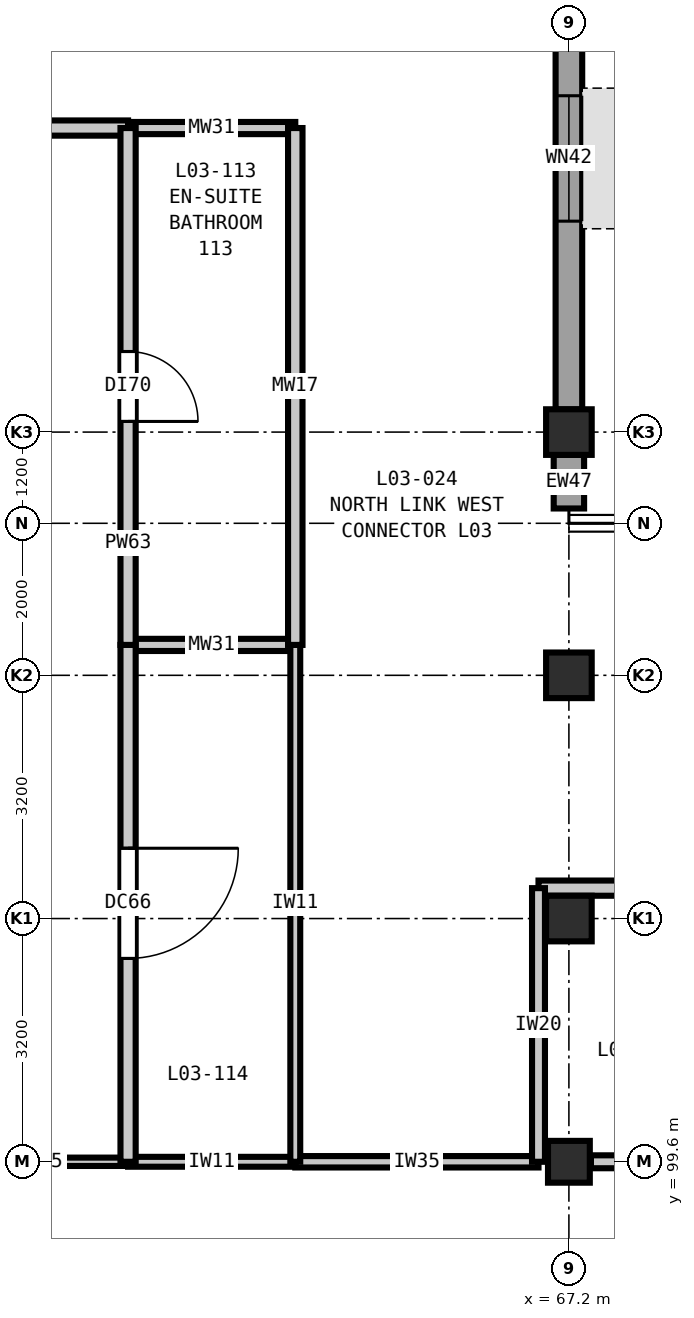
"""IFC4 building model, lengths in metres.
Left out: names, types, materials, properties, quantities, classifications, styles, units other than length and angle.
Written with IfcOpenShell. Run it as: python <this file> out.ifc"""

import sys

from ifc_helpers import new_model, si_unit, direction, frame, frame_2d, origin, origin_2d, place, context, subcontext, project, spatial, rectangle, extrude, element, fill, save


model = new_model("IFC4")
c1 = context("Model", 3, precision=1e-05, world=origin(), true_north=direction((0.0, 1.0)))
c2 = subcontext(c1, "Body", "Model", "MODEL_VIEW")
j1 = project(units=[si_unit("LENGTHUNIT", "METRE"), si_unit("PLANEANGLEUNIT", "RADIAN")], contexts=[c1])
p1 = place(None, origin())
s1 = spatial("IfcSite", under=j1, at=p1, CompositionType="ELEMENT")
p2 = place(p1, origin())
s2 = spatial("IfcBuilding", under=s1, at=p2, CompositionType="ELEMENT")
p3 = place(p2, frame((0.0, 0.0, 16.2)))
s3 = spatial("IfcBuildingStorey", under=s2, at=p3, CompositionType="ELEMENT", Elevation=16.2)
p4 = place(p3, frame((67.2, 99.6, 0.0), z_axis=(0.0, 0.0, 1.0), x_axis=(1.0, 0.0, 0.0)))
e1 = element("IfcColumn", 1, at=p4, inside=s3, PredefinedType="COLUMN", context=c2, shape_type="SweptSolid", body=[
    extrude(rectangle(XDim=0.55, YDim=0.55, at=origin_2d()), origin(), (0.0, 0.0, 1.0), 4.2),
])
for number, where, z_axis, x_axis in (
    (2, (67.2, 102.8, 0.0), (0.0, 0.0, 1.0), (1.0, 0.0, 0.0)),
    (3, (67.2, 106.0, 0.0), (0.0, 0.0, 1.0), (1.0, 0.0, 0.0)),
    (4, (67.2, 109.2, 0.0), (0.0, 0.0, 1.0), (1.0, 0.0, 0.0)),
):
    element("IfcColumn", number, at=place(p3, frame(where, z_axis=z_axis, x_axis=x_axis)), inside=s3, PredefinedType="COLUMN", context=c2, shape_type="SweptSolid", body=[
        extrude(rectangle(XDim=0.6, YDim=0.6, at=origin_2d()), origin(), (0.0, 0.0, 1.0), 4.2),
    ])
p5 = place(p3, frame((67.2, 116.102, 0.0), z_axis=(0.0, 0.0, 1.0), x_axis=(0.0, -1.0, 0.0)))
e5 = element("IfcWall", 5, at=p5, inside=s3, PredefinedType="SOLIDWALL", context=c2, shape_type="SweptSolid", body=[
    extrude(rectangle(XDim=6.604, YDim=0.35, at=frame_2d((3.302, 0.0))), origin(), (0.0, 0.0, 1.0), 3.48),
])
p6 = place(p5, frame((2.477, 0.0, 0.9)))
e6 = element("IfcOpeningElement", 6, at=p6, cuts=e5, PredefinedType="OPENING", context=c2, shape_type="SweptSolid", body=[
    extrude(rectangle(XDim=1.65, YDim=2.15, at=frame_2d((0.825, 1.075))), frame((0.0, 0.185, 0.0), z_axis=(0.0, -1.0, 0.0), x_axis=(1.0, 0.0, 0.0)), (0.0, 0.0, 1.0), 0.37),
])
p7 = place(p3, frame((67.2, 108.902, 0.0), z_axis=(0.0, 0.0, 1.0), x_axis=(0.0, -1.0, 0.0)))
e7 = element("IfcWall", 7, at=p7, inside=s3, PredefinedType="SOLIDWALL", context=c2, shape_type="SweptSolid", body=[
    extrude(rectangle(XDim=0.707, YDim=0.4, at=frame_2d((0.354, 0.0))), origin(), (0.0, 0.0, 1.0), 3.48),
])
p8 = place(p3, frame((59.09, 99.6, 0.0), z_axis=(0.0, 0.0, 1.0), x_axis=(1.0, 0.0, 0.0)))
e8 = element("IfcWall", 8, at=p8, inside=s3, PredefinedType="PARTITIONING", context=c2, shape_type="SweptSolid", body=[
    extrude(rectangle(XDim=2.31, YDim=0.11, at=frame_2d((1.155, 0.0))), origin(), (0.0, 0.0, 1.0), 3.535),
])
p9 = place(p3, frame((61.4, 99.6, 0.0), z_axis=(0.0, 0.0, 1.0), x_axis=(1.0, 0.0, 0.0)))
e9 = element("IfcWall", 9, at=p9, inside=s3, PredefinedType="PARTITIONING", context=c2, shape_type="SweptSolid", body=[
    extrude(rectangle(XDim=2.2, YDim=0.13, at=frame_2d((1.1, 0.0))), origin(), (0.0, 0.0, 1.0), 3.535),
])
p10 = place(p3, frame((63.6, 99.6, 0.0), z_axis=(0.0, 0.0, 1.0), x_axis=(1.0, 0.0, 0.0)))
e10 = element("IfcWall", 10, at=p10, inside=s3, PredefinedType="PARTITIONING", context=c2, shape_type="SweptSolid", body=[
    extrude(rectangle(XDim=3.2, YDim=0.15, at=frame_2d((1.6, 0.0))), origin(), (0.0, 0.0, 1.0), 3.535),
])
p11 = place(p3, frame((67.49, 99.6, 0.0), z_axis=(0.0, 0.0, 1.0), x_axis=(1.0, 0.0, 0.0)))
e11 = element("IfcWall", 11, at=p11, inside=s3, PredefinedType="PARTITIONING", context=c2, shape_type="SweptSolid", body=[
    extrude(rectangle(XDim=1.81, YDim=0.17, at=frame_2d((0.905, 0.0))), origin(), (0.0, 0.0, 1.0), 3.535),
])
p12 = place(p3, frame((66.8, 103.2, 0.0), z_axis=(0.0, 0.0, 1.0), x_axis=(1.0, 0.0, 0.0)))
e12 = element("IfcWall", 12, at=p12, inside=s3, PredefinedType="PARTITIONING", context=c2, shape_type="SweptSolid", body=[
    extrude(rectangle(XDim=7.6, YDim=0.2, at=frame_2d((3.8, 0.0))), origin(), (0.0, 0.0, 1.0), 3.89),
])
p13 = place(p12, frame((3.075, 0.0, 0.0)))
e13 = element("IfcOpeningElement", 13, at=p13, cuts=e12, PredefinedType="OPENING", context=c2, shape_type="SweptSolid", body=[
    extrude(rectangle(XDim=1.45, YDim=2.25, at=frame_2d((0.725, 1.125))), frame((0.0, 0.11, 0.0), z_axis=(0.0, -1.0, 0.0), x_axis=(1.0, 0.0, 0.0)), (0.0, 0.0, 1.0), 0.22),
])
p14 = place(p3, frame((61.4, 106.4, 0.0), z_axis=(0.0, 0.0, 1.0), x_axis=(1.0, 0.0, 0.0)))
e14 = element("IfcWall", 14, at=p14, inside=s3, PredefinedType="PLUMBINGWALL", context=c2, shape_type="SweptSolid", body=[
    extrude(rectangle(XDim=2.2, YDim=0.16, at=frame_2d((1.1, 0.0))), origin(), (0.0, 0.0, 1.0), 3.89),
])
p15 = place(p3, frame((56.4, 113.2, 0.0), z_axis=(0.0, 0.0, 1.0), x_axis=(1.0, 0.0, 0.0)))
e15 = element("IfcWall", 15, at=p15, inside=s3, PredefinedType="PARTITIONING", context=c2, shape_type="SweptSolid", body=[
    extrude(rectangle(XDim=5.0, YDim=0.2, at=frame_2d((2.5, 0.0))), origin(), (0.0, 0.0, 1.0), 3.89),
])
p16 = place(p15, frame((1.85, 0.0, 0.0)))
e16 = element("IfcOpeningElement", 16, at=p16, cuts=e15, PredefinedType="OPENING", context=c2, shape_type="SweptSolid", body=[
    extrude(rectangle(XDim=1.3, YDim=2.2, at=frame_2d((0.65, 1.1))), frame((0.0, 0.11, 0.0), z_axis=(0.0, -1.0, 0.0), x_axis=(1.0, 0.0, 0.0)), (0.0, 0.0, 1.0), 0.22),
])
p17 = place(p3, frame((61.4, 113.2, 0.0), z_axis=(0.0, 0.0, 1.0), x_axis=(1.0, 0.0, 0.0)))
e17 = element("IfcWall", 17, at=p17, inside=s3, PredefinedType="PLUMBINGWALL", context=c2, shape_type="SweptSolid", body=[
    extrude(rectangle(XDim=2.2, YDim=0.16, at=frame_2d((1.1, 0.0))), origin(), (0.0, 0.0, 1.0), 3.89),
])
p18 = place(p3, frame((61.4, 99.6, 0.0), z_axis=(0.0, 0.0, 1.0), x_axis=(0.0, 1.0, 0.0)))
e18 = element("IfcWall", 18, at=p18, inside=s3, PredefinedType="PARTITIONING", context=c2, shape_type="SweptSolid", body=[
    extrude(rectangle(XDim=6.8, YDim=0.2, at=frame_2d((3.4, 0.0))), origin(), (0.0, 0.0, 1.0), 3.89),
])
p19 = place(p18, frame((2.675, 0.0, 0.0)))
e19 = element("IfcOpeningElement", 19, at=p19, cuts=e18, PredefinedType="OPENING", context=c2, shape_type="SweptSolid", body=[
    extrude(rectangle(XDim=1.45, YDim=2.25, at=frame_2d((0.725, 1.125))), frame((0.0, 0.11, 0.0), z_axis=(0.0, -1.0, 0.0), x_axis=(1.0, 0.0, 0.0)), (0.0, 0.0, 1.0), 0.22),
])
p20 = place(p3, frame((61.4, 106.4, 0.0), z_axis=(0.0, 0.0, 1.0), x_axis=(0.0, 1.0, 0.0)))
e20 = element("IfcWall", 20, at=p20, inside=s3, PredefinedType="PARTITIONING", context=c2, shape_type="SweptSolid", body=[
    extrude(rectangle(XDim=6.8, YDim=0.2, at=frame_2d((3.4, 0.0))), origin(), (0.0, 0.0, 1.0), 3.89),
])
p21 = place(p20, frame((2.94, 0.0, 0.0)))
e21 = element("IfcOpeningElement", 21, at=p21, cuts=e20, PredefinedType="OPENING", context=c2, shape_type="SweptSolid", body=[
    extrude(rectangle(XDim=0.92, YDim=2.1, at=frame_2d((0.46, 1.05))), frame((0.0, 0.11, 0.0), z_axis=(0.0, -1.0, 0.0), x_axis=(1.0, 0.0, 0.0)), (0.0, 0.0, 1.0), 0.22),
])
p22 = place(p3, frame((63.6, 99.6, 0.0), z_axis=(0.0, 0.0, 1.0), x_axis=(0.0, 1.0, 0.0)))
e22 = element("IfcWall", 22, at=p22, inside=s3, PredefinedType="PARTITIONING", context=c2, shape_type="SweptSolid", body=[
    extrude(rectangle(XDim=6.8, YDim=0.13, at=frame_2d((3.4, 0.0))), origin(), (0.0, 0.0, 1.0), 3.89),
])
p23 = place(p3, frame((63.6, 106.4, 0.0), z_axis=(0.0, 0.0, 1.0), x_axis=(0.0, 1.0, 0.0)))
e23 = element("IfcWall", 23, at=p23, inside=s3, PredefinedType="PLUMBINGWALL", context=c2, shape_type="SweptSolid", body=[
    extrude(rectangle(XDim=6.8, YDim=0.19, at=frame_2d((3.4, 0.0))), origin(), (0.0, 0.0, 1.0), 3.89),
])
p24 = place(p3, frame((66.8, 99.6, 0.0), z_axis=(0.0, 0.0, 1.0), x_axis=(0.0, 1.0, 0.0)))
e24 = element("IfcWall", 24, at=p24, inside=s3, PredefinedType="PARTITIONING", context=c2, shape_type="SweptSolid", body=[
    extrude(rectangle(XDim=3.6, YDim=0.17, at=frame_2d((1.8, 0.0))), origin(), (0.0, 0.0, 1.0), 3.89),
])
p25 = place(p6, origin())
e25 = element("IfcWindow", 25, at=p25, inside=s3, PartitioningType="DOUBLE_PANEL_VERTICAL", PredefinedType="WINDOW", context=c2, shape_type="SweptSolid", body=[
    extrude(rectangle(XDim=1.65, YDim=2.15, at=frame_2d((0.825, 1.075))), frame((0.0, 0.03, 0.0), z_axis=(0.0, -1.0, 0.0), x_axis=(1.0, 0.0, 0.0)), (0.0, 0.0, 1.0), 0.06),
])
fill(e6, e25)
p26 = place(p19, frame((1.45, 0.0, 0.0), z_axis=(0.0, 0.0, 1.0), x_axis=(-1.0, 0.0, 0.0)))
e26 = element("IfcDoor", 26, at=p26, inside=s3, OperationType="SINGLE_SWING_LEFT", PredefinedType="DOOR", context=c2, shape_type="SweptSolid", body=[
    extrude(rectangle(XDim=1.45, YDim=2.25, at=frame_2d((0.725, 1.125))), frame((0.0, 0.025, 0.0), z_axis=(0.0, -1.0, 0.0), x_axis=(1.0, 0.0, 0.0)), (0.0, 0.0, 1.0), 0.05),
])
fill(e19, e26)
p27 = place(p21, frame((0.92, 0.0, 0.0), z_axis=(0.0, 0.0, 1.0), x_axis=(-1.0, 0.0, 0.0)))
e27 = element("IfcDoor", 27, at=p27, inside=s3, OperationType="SINGLE_SWING_RIGHT", PredefinedType="DOOR", context=c2, shape_type="SweptSolid", body=[
    extrude(rectangle(XDim=0.92, YDim=2.1, at=frame_2d((0.46, 1.05))), frame((0.0, 0.025, 0.0), z_axis=(0.0, -1.0, 0.0), x_axis=(1.0, 0.0, 0.0)), (0.0, 0.0, 1.0), 0.05),
])
fill(e21, e27)
save(model, sys.argv[1])
